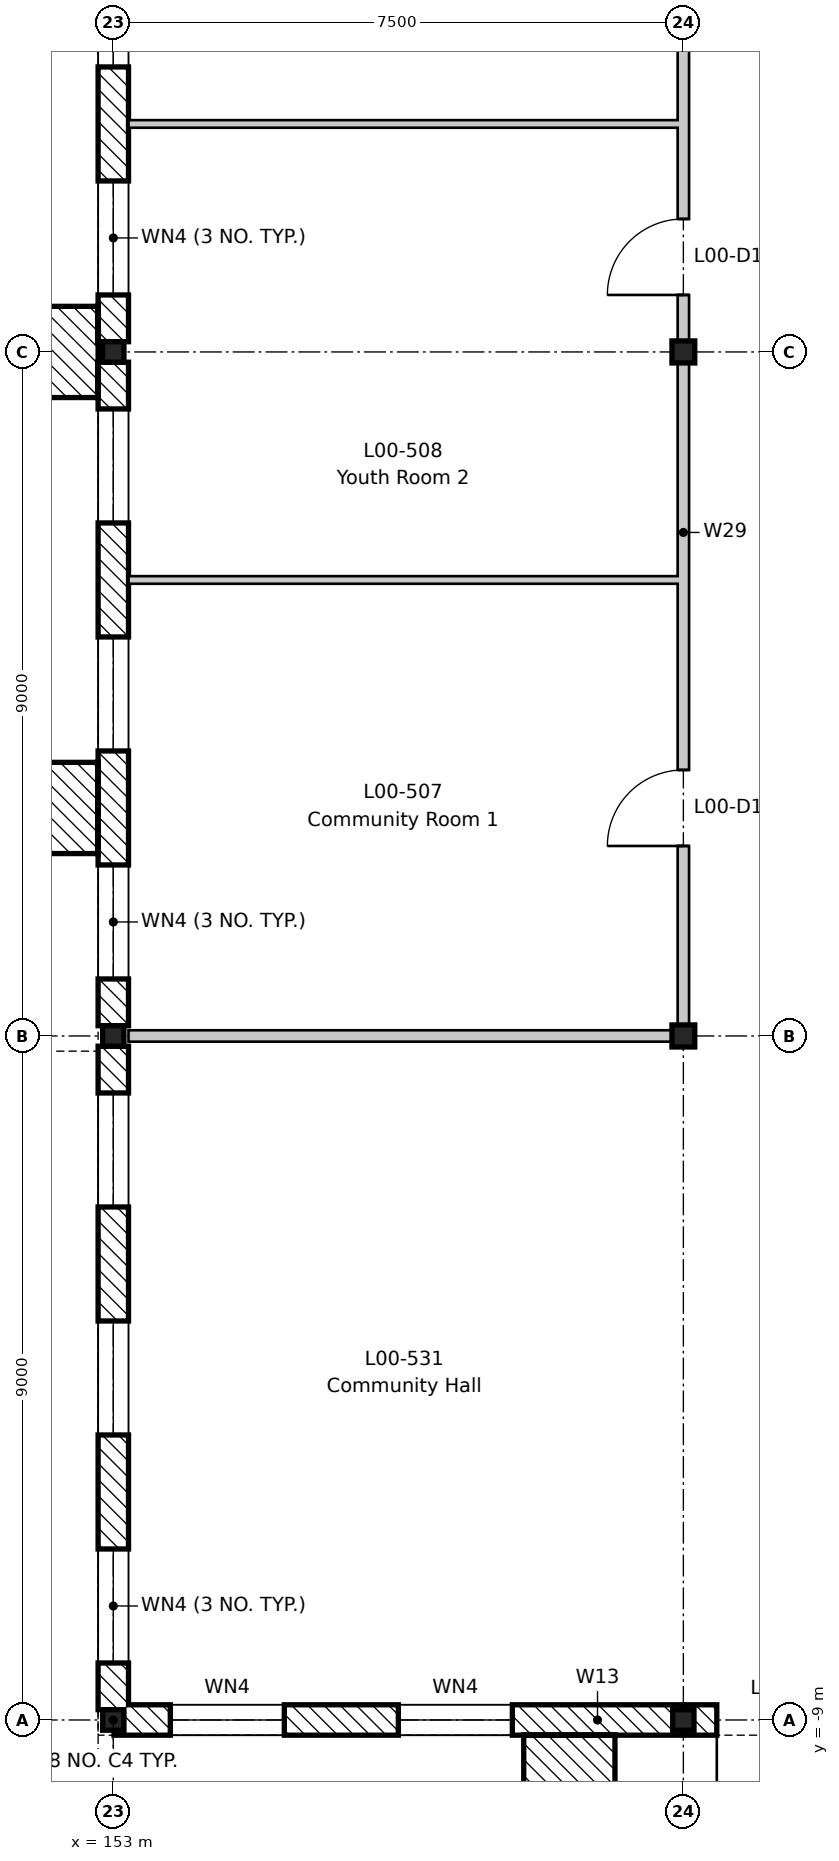
"""IFC4 building model, lengths in metres.
Left out: names, types, materials, properties, quantities, classifications, styles, units other than length and angle.
Written with IfcOpenShell. Run it as: python <this file> out.ifc"""

import sys

from ifc_helpers import new_model, si_unit, direction, frame, frame_2d, origin, origin_2d, place, context, subcontext, project, spatial, rectangle, i_section, extrude, element, fill, save


model = new_model("IFC4")
c1 = context("Model", 3, precision=1e-05, world=origin(), true_north=direction((0.0, 1.0)))
c2 = subcontext(c1, "Body", "Model", "MODEL_VIEW")
j1 = project(units=[si_unit("LENGTHUNIT", "METRE"), si_unit("PLANEANGLEUNIT", "RADIAN")], contexts=[c1])
p1 = place(None, origin())
s1 = spatial("IfcSite", under=j1, at=p1, CompositionType="ELEMENT")
p2 = place(p1, origin())
s2 = spatial("IfcBuilding", under=s1, at=p2, CompositionType="ELEMENT")
p3 = place(p2, origin())
s3 = spatial("IfcBuildingStorey", under=s2, at=p3, CompositionType="ELEMENT", Elevation=0.0)
for number, where, z_axis, x_axis in (
    (1, (153.0, -9.0, -0.6), (0.0, 0.0, 1.0), (1.0, 0.0, 0.0)),
    (2, (153.0, 0.0, -0.6), (0.0, 0.0, 1.0), (1.0, 0.0, 0.0)),
    (3, (153.0, 9.0, -0.6), (0.0, 0.0, 1.0), (1.0, 0.0, 0.0)),
    (4, (160.5, -9.0, -0.6), (0.0, 0.0, 1.0), (1.0, 0.0, 0.0)),
):
    element("IfcColumn", number, at=place(p3, frame(where, z_axis=z_axis, x_axis=x_axis)), inside=s3, PredefinedType="COLUMN", context=c2, shape_type="SweptSolid", body=[
        extrude(i_section(OverallWidth=0.28, OverallDepth=0.27, WebThickness=0.008, FlangeThickness=0.013, FilletRadius=0.024, at=origin_2d()), origin(), (0.0, 0.0, 1.0), 5.8),
    ])
for number, where, z_axis, x_axis in (
    (5, (160.5, 0.0, -0.6), (0.0, 0.0, 1.0), (1.0, 0.0, 0.0)),
    (6, (160.5, 9.0, -0.6), (0.0, 0.0, 1.0), (1.0, 0.0, 0.0)),
):
    element("IfcColumn", number, at=place(p3, frame(where, z_axis=z_axis, x_axis=x_axis)), inside=s3, PredefinedType="COLUMN", context=c2, shape_type="SweptSolid", body=[
        extrude(i_section(OverallWidth=0.3, OverallDepth=0.29, WebThickness=0.009, FlangeThickness=0.014, FilletRadius=0.027, at=origin_2d()), origin(), (0.0, 0.0, 1.0), 5.8),
    ])
p4 = place(p3, frame((153.0, -8.865, 0.0), z_axis=(0.0, 0.0, 1.0), x_axis=(0.0, 1.0, 0.0)))
e7 = element("IfcWall", 7, at=p4, inside=s3, PredefinedType="STANDARD", context=c2, shape_type="SweptSolid", body=[
    extrude(rectangle(XDim=8.73, YDim=0.4, at=frame_2d((4.365, 0.0))), origin(), (0.0, 0.0, 1.0), 4.8),
])
p5 = place(p4, frame((0.615, 0.0, 0.3)))
e8 = element("IfcOpeningElement", 8, at=p5, cuts=e7, PredefinedType="OPENING", context=c2, shape_type="SweptSolid", body=[
    extrude(rectangle(XDim=1.5, YDim=3.3, at=frame_2d((0.75, 1.65))), frame((0.0, 0.21, 0.0), z_axis=(0.0, -1.0, 0.0), x_axis=(1.0, 0.0, 0.0)), (0.0, 0.0, 1.0), 0.42),
])
p6 = place(p4, frame((3.615, 0.0, 0.3)))
e9 = element("IfcOpeningElement", 9, at=p6, cuts=e7, PredefinedType="OPENING", context=c2, shape_type="SweptSolid", body=[
    extrude(rectangle(XDim=1.5, YDim=3.3, at=frame_2d((0.75, 1.65))), frame((0.0, 0.21, 0.0), z_axis=(0.0, -1.0, 0.0), x_axis=(1.0, 0.0, 0.0)), (0.0, 0.0, 1.0), 0.42),
])
p7 = place(p4, frame((6.615, 0.0, 0.3)))
e10 = element("IfcOpeningElement", 10, at=p7, cuts=e7, PredefinedType="OPENING", context=c2, shape_type="SweptSolid", body=[
    extrude(rectangle(XDim=1.5, YDim=3.3, at=frame_2d((0.75, 1.65))), frame((0.0, 0.21, 0.0), z_axis=(0.0, -1.0, 0.0), x_axis=(1.0, 0.0, 0.0)), (0.0, 0.0, 1.0), 0.42),
])
p8 = place(p3, frame((153.0, 0.135, 0.0), z_axis=(0.0, 0.0, 1.0), x_axis=(0.0, 1.0, 0.0)))
e11 = element("IfcWall", 11, at=p8, inside=s3, PredefinedType="STANDARD", context=c2, shape_type="SweptSolid", body=[
    extrude(rectangle(XDim=8.73, YDim=0.4, at=frame_2d((4.365, 0.0))), origin(), (0.0, 0.0, 1.0), 4.8),
])
p9 = place(p8, frame((0.615, 0.0, 0.3)))
e12 = element("IfcOpeningElement", 12, at=p9, cuts=e11, PredefinedType="OPENING", context=c2, shape_type="SweptSolid", body=[
    extrude(rectangle(XDim=1.5, YDim=3.3, at=frame_2d((0.75, 1.65))), frame((0.0, 0.21, 0.0), z_axis=(0.0, -1.0, 0.0), x_axis=(1.0, 0.0, 0.0)), (0.0, 0.0, 1.0), 0.42),
])
p10 = place(p8, frame((3.615, 0.0, 0.3)))
e13 = element("IfcOpeningElement", 13, at=p10, cuts=e11, PredefinedType="OPENING", context=c2, shape_type="SweptSolid", body=[
    extrude(rectangle(XDim=1.5, YDim=3.3, at=frame_2d((0.75, 1.65))), frame((0.0, 0.21, 0.0), z_axis=(0.0, -1.0, 0.0), x_axis=(1.0, 0.0, 0.0)), (0.0, 0.0, 1.0), 0.42),
])
p11 = place(p8, frame((6.615, 0.0, 0.3)))
e14 = element("IfcOpeningElement", 14, at=p11, cuts=e11, PredefinedType="OPENING", context=c2, shape_type="SweptSolid", body=[
    extrude(rectangle(XDim=1.5, YDim=3.3, at=frame_2d((0.75, 1.65))), frame((0.0, 0.21, 0.0), z_axis=(0.0, -1.0, 0.0), x_axis=(1.0, 0.0, 0.0)), (0.0, 0.0, 1.0), 0.42),
])
p12 = place(p3, frame((153.0, 9.135, 0.0), z_axis=(0.0, 0.0, 1.0), x_axis=(0.0, 1.0, 0.0)))
e15 = element("IfcWall", 15, at=p12, inside=s3, PredefinedType="STANDARD", context=c2, shape_type="SweptSolid", body=[
    extrude(rectangle(XDim=8.73, YDim=0.4, at=frame_2d((4.365, 0.0))), origin(), (0.0, 0.0, 1.0), 4.8),
])
p13 = place(p12, frame((0.615, 0.0, 0.3)))
e16 = element("IfcOpeningElement", 16, at=p13, cuts=e15, PredefinedType="OPENING", context=c2, shape_type="SweptSolid", body=[
    extrude(rectangle(XDim=1.5, YDim=3.3, at=frame_2d((0.75, 1.65))), frame((0.0, 0.21, 0.0), z_axis=(0.0, -1.0, 0.0), x_axis=(1.0, 0.0, 0.0)), (0.0, 0.0, 1.0), 0.42),
])
p14 = place(p12, frame((3.615, 0.0, 0.3)))
e17 = element("IfcOpeningElement", 17, at=p14, cuts=e15, PredefinedType="OPENING", context=c2, shape_type="SweptSolid", body=[
    extrude(rectangle(XDim=1.5, YDim=3.3, at=frame_2d((0.75, 1.65))), frame((0.0, 0.21, 0.0), z_axis=(0.0, -1.0, 0.0), x_axis=(1.0, 0.0, 0.0)), (0.0, 0.0, 1.0), 0.42),
])
p15 = place(p12, frame((6.615, 0.0, 0.3)))
e18 = element("IfcOpeningElement", 18, at=p15, cuts=e15, PredefinedType="OPENING", context=c2, shape_type="SweptSolid", body=[
    extrude(rectangle(XDim=1.5, YDim=3.3, at=frame_2d((0.75, 1.65))), frame((0.0, 0.21, 0.0), z_axis=(0.0, -1.0, 0.0), x_axis=(1.0, 0.0, 0.0)), (0.0, 0.0, 1.0), 0.42),
])
p16 = place(p3, frame((160.491, -9.0, 0.0), z_axis=(0.0, 0.0, 1.0), x_axis=(-1.0, 0.0, 0.0)))
e19 = element("IfcWall", 19, at=p16, inside=s3, PredefinedType="STANDARD", context=c2, shape_type="SweptSolid", body=[
    extrude(rectangle(XDim=7.482, YDim=0.4, at=frame_2d((3.741, 0.0))), origin(), (0.0, 0.0, 1.0), 4.87),
])
p17 = place(p16, frame((5.241, 0.0, 0.3)))
e20 = element("IfcOpeningElement", 20, at=p17, cuts=e19, PredefinedType="OPENING", context=c2, shape_type="SweptSolid", body=[
    extrude(rectangle(XDim=1.5, YDim=3.3, at=frame_2d((0.75, 1.65))), frame((0.0, 0.21, 0.0), z_axis=(0.0, -1.0, 0.0), x_axis=(1.0, 0.0, 0.0)), (0.0, 0.0, 1.0), 0.42),
])
p18 = place(p16, frame((2.241, 0.0, 0.3)))
e21 = element("IfcOpeningElement", 21, at=p18, cuts=e19, PredefinedType="OPENING", context=c2, shape_type="SweptSolid", body=[
    extrude(rectangle(XDim=1.5, YDim=3.3, at=frame_2d((0.75, 1.65))), frame((0.0, 0.21, 0.0), z_axis=(0.0, -1.0, 0.0), x_axis=(1.0, 0.0, 0.0)), (0.0, 0.0, 1.0), 0.42),
])
p19 = place(p3, frame((163.491, -9.0, 0.0), z_axis=(0.0, 0.0, 1.0), x_axis=(-1.0, 0.0, 0.0)))
e22 = element("IfcWall", 22, at=p19, inside=s3, PredefinedType="STANDARD", context=c2, shape_type="SweptSolid", body=[
    extrude(rectangle(XDim=2.982, YDim=0.4, at=frame_2d((1.491, 0.0))), origin(), (0.0, 0.0, 1.0), 5.0),
])
p20 = place(p19, frame((0.431, 0.0, 0.0)))
e23 = element("IfcOpeningElement", 23, at=p20, cuts=e22, PredefinedType="OPENING", context=c2, shape_type="SweptSolid", body=[
    extrude(rectangle(XDim=2.12, YDim=2.4, at=frame_2d((1.06, 1.2))), frame((0.0, 0.21, 0.0), z_axis=(0.0, -1.0, 0.0), x_axis=(1.0, 0.0, 0.0)), (0.0, 0.0, 1.0), 0.42),
])
for number, where, z_axis, x_axis in (
    (24, (152.2, 2.4, 0.0), (0.0, 0.0, 1.0), (0.0, 1.0, 0.0)),
    (25, (152.2, 8.4, 0.0), (0.0, 0.0, 1.0), (0.0, 1.0, 0.0)),
    (26, (158.4, -9.8, 0.0), (0.0, 0.0, 1.0), (1.0, 0.0, 0.0)),
):
    element("IfcWall", number, at=place(p3, frame(where, z_axis=z_axis, x_axis=x_axis)), inside=s3, PredefinedType="STANDARD", context=c2, shape_type="SweptSolid", body=[
        extrude(rectangle(XDim=1.2, YDim=1.2, at=frame_2d((0.6, 0.0))), origin(), (0.0, 0.0, 1.0), 5.4),
    ])
p21 = place(p3, frame((153.2, 0.0, 0.0), z_axis=(0.0, 0.0, 1.0), x_axis=(1.0, 0.0, 0.0)))
e27 = element("IfcWall", 27, at=p21, inside=s3, PredefinedType="PARTITIONING", context=c2, shape_type="SweptSolid", body=[
    extrude(rectangle(XDim=7.225, YDim=0.15, at=frame_2d((3.613, 0.0))), origin(), (0.0, 0.0, 1.0), 4.85),
])
for number, where, z_axis, x_axis in (
    (28, (153.2, 6.0, 0.0), (0.0, 0.0, 1.0), (1.0, 0.0, 0.0)),
    (29, (153.2, 12.0, 0.0), (0.0, 0.0, 1.0), (1.0, 0.0, 0.0)),
):
    element("IfcWall", number, at=place(p3, frame(where, z_axis=z_axis, x_axis=x_axis)), inside=s3, PredefinedType="PARTITIONING", context=c2, shape_type="SweptSolid", body=[
        extrude(rectangle(XDim=7.225, YDim=0.1, at=frame_2d((3.613, 0.0))), origin(), (0.0, 0.0, 1.0), 5.2),
    ])
p22 = place(p3, frame((160.5, 0.0, 0.0), z_axis=(0.0, 0.0, 1.0), x_axis=(0.0, 1.0, 0.0)))
e30 = element("IfcWall", 30, at=p22, inside=s3, PredefinedType="PARTITIONING", context=c2, shape_type="SweptSolid", body=[
    extrude(rectangle(XDim=53.8, YDim=0.15, at=frame_2d((26.9, 0.0))), origin(), (0.0, 0.0, 1.0), 4.68),
])
p23 = place(p22, frame((2.5, 0.0, 0.0)))
e31 = element("IfcOpeningElement", 31, at=p23, cuts=e30, PredefinedType="OPENING", context=c2, shape_type="SweptSolid", body=[
    extrude(rectangle(XDim=1.0, YDim=2.1, at=frame_2d((0.5, 1.05))), frame((0.0, 0.085, 0.0), z_axis=(0.0, -1.0, 0.0), x_axis=(1.0, 0.0, 0.0)), (0.0, 0.0, 1.0), 0.17),
])
p24 = place(p22, frame((9.75, 0.0, 0.0)))
e32 = element("IfcOpeningElement", 32, at=p24, cuts=e30, PredefinedType="OPENING", context=c2, shape_type="SweptSolid", body=[
    extrude(rectangle(XDim=1.0, YDim=2.1, at=frame_2d((0.5, 1.05))), frame((0.0, 0.085, 0.0), z_axis=(0.0, -1.0, 0.0), x_axis=(1.0, 0.0, 0.0)), (0.0, 0.0, 1.0), 0.17),
])
p25 = place(p22, frame((14.5, 0.0, 0.0)))
e33 = element("IfcOpeningElement", 33, at=p25, cuts=e30, PredefinedType="OPENING", context=c2, shape_type="SweptSolid", body=[
    extrude(rectangle(XDim=1.0, YDim=2.1, at=frame_2d((0.5, 1.05))), frame((0.0, 0.085, 0.0), z_axis=(0.0, -1.0, 0.0), x_axis=(1.0, 0.0, 0.0)), (0.0, 0.0, 1.0), 0.17),
])
p26 = place(p22, frame((19.0, 0.0, 0.0)))
e34 = element("IfcOpeningElement", 34, at=p26, cuts=e30, PredefinedType="OPENING", context=c2, shape_type="SweptSolid", body=[
    extrude(rectangle(XDim=1.0, YDim=2.1, at=frame_2d((0.5, 1.05))), frame((0.0, 0.085, 0.0), z_axis=(0.0, -1.0, 0.0), x_axis=(1.0, 0.0, 0.0)), (0.0, 0.0, 1.0), 0.17),
])
p27 = place(p22, frame((24.8, 0.0, 0.0)))
e35 = element("IfcOpeningElement", 35, at=p27, cuts=e30, PredefinedType="OPENING", context=c2, shape_type="SweptSolid", body=[
    extrude(rectangle(XDim=1.4, YDim=2.1, at=frame_2d((0.7, 1.05))), frame((0.0, 0.085, 0.0), z_axis=(0.0, -1.0, 0.0), x_axis=(1.0, 0.0, 0.0)), (0.0, 0.0, 1.0), 0.17),
])
p28 = place(p22, frame((32.5, 0.0, 0.0)))
e36 = element("IfcOpeningElement", 36, at=p28, cuts=e30, PredefinedType="OPENING", context=c2, shape_type="SweptSolid", body=[
    extrude(rectangle(XDim=1.0, YDim=2.1, at=frame_2d((0.5, 1.05))), frame((0.0, 0.085, 0.0), z_axis=(0.0, -1.0, 0.0), x_axis=(1.0, 0.0, 0.0)), (0.0, 0.0, 1.0), 0.17),
])
p29 = place(p22, frame((37.0, 0.0, 0.0)))
e37 = element("IfcOpeningElement", 37, at=p29, cuts=e30, PredefinedType="OPENING", context=c2, shape_type="SweptSolid", body=[
    extrude(rectangle(XDim=1.0, YDim=2.1, at=frame_2d((0.5, 1.05))), frame((0.0, 0.085, 0.0), z_axis=(0.0, -1.0, 0.0), x_axis=(1.0, 0.0, 0.0)), (0.0, 0.0, 1.0), 0.17),
])
p30 = place(p22, frame((40.0, 0.0, 0.0)))
e38 = element("IfcOpeningElement", 38, at=p30, cuts=e30, PredefinedType="OPENING", context=c2, shape_type="SweptSolid", body=[
    extrude(rectangle(XDim=1.0, YDim=2.1, at=frame_2d((0.5, 1.05))), frame((0.0, 0.085, 0.0), z_axis=(0.0, -1.0, 0.0), x_axis=(1.0, 0.0, 0.0)), (0.0, 0.0, 1.0), 0.17),
])
p31 = place(p22, frame((45.75, 0.0, 0.0)))
e39 = element("IfcOpeningElement", 39, at=p31, cuts=e30, PredefinedType="OPENING", context=c2, shape_type="SweptSolid", body=[
    extrude(rectangle(XDim=1.0, YDim=2.1, at=frame_2d((0.5, 1.05))), frame((0.0, 0.085, 0.0), z_axis=(0.0, -1.0, 0.0), x_axis=(1.0, 0.0, 0.0)), (0.0, 0.0, 1.0), 0.17),
])
p32 = place(p22, frame((49.0, 0.0, 0.0)))
e40 = element("IfcOpeningElement", 40, at=p32, cuts=e30, PredefinedType="OPENING", context=c2, shape_type="SweptSolid", body=[
    extrude(rectangle(XDim=1.0, YDim=2.1, at=frame_2d((0.5, 1.05))), frame((0.0, 0.085, 0.0), z_axis=(0.0, -1.0, 0.0), x_axis=(1.0, 0.0, 0.0)), (0.0, 0.0, 1.0), 0.17),
])
p33 = place(p22, frame((52.0, 0.0, 0.0)))
e41 = element("IfcOpeningElement", 41, at=p33, cuts=e30, PredefinedType="OPENING", context=c2, shape_type="SweptSolid", body=[
    extrude(rectangle(XDim=1.0, YDim=2.1, at=frame_2d((0.5, 1.05))), frame((0.0, 0.085, 0.0), z_axis=(0.0, -1.0, 0.0), x_axis=(1.0, 0.0, 0.0)), (0.0, 0.0, 1.0), 0.17),
])
p34 = place(p5, origin())
e42 = element("IfcWindow", 42, at=p34, inside=s3, PartitioningType="SINGLE_PANEL", PredefinedType="WINDOW", context=c2, shape_type="SweptSolid", body=[
    extrude(rectangle(XDim=1.5, YDim=3.3, at=frame_2d((0.75, 1.65))), frame((0.0, -0.12, 0.0), z_axis=(0.0, -1.0, 0.0), x_axis=(1.0, 0.0, 0.0)), (0.0, 0.0, 1.0), 0.06),
])
fill(e8, e42)
p35 = place(p6, origin())
e43 = element("IfcWindow", 43, at=p35, inside=s3, PartitioningType="SINGLE_PANEL", PredefinedType="WINDOW", context=c2, shape_type="SweptSolid", body=[
    extrude(rectangle(XDim=1.5, YDim=3.3, at=frame_2d((0.75, 1.65))), frame((0.0, -0.12, 0.0), z_axis=(0.0, -1.0, 0.0), x_axis=(1.0, 0.0, 0.0)), (0.0, 0.0, 1.0), 0.06),
])
fill(e9, e43)
p36 = place(p7, origin())
e44 = element("IfcWindow", 44, at=p36, inside=s3, PartitioningType="SINGLE_PANEL", PredefinedType="WINDOW", context=c2, shape_type="SweptSolid", body=[
    extrude(rectangle(XDim=1.5, YDim=3.3, at=frame_2d((0.75, 1.65))), frame((0.0, -0.12, 0.0), z_axis=(0.0, -1.0, 0.0), x_axis=(1.0, 0.0, 0.0)), (0.0, 0.0, 1.0), 0.06),
])
fill(e10, e44)
p37 = place(p9, origin())
e45 = element("IfcWindow", 45, at=p37, inside=s3, PartitioningType="SINGLE_PANEL", PredefinedType="WINDOW", context=c2, shape_type="SweptSolid", body=[
    extrude(rectangle(XDim=1.5, YDim=3.3, at=frame_2d((0.75, 1.65))), frame((0.0, -0.12, 0.0), z_axis=(0.0, -1.0, 0.0), x_axis=(1.0, 0.0, 0.0)), (0.0, 0.0, 1.0), 0.06),
])
fill(e12, e45)
p38 = place(p10, origin())
e46 = element("IfcWindow", 46, at=p38, inside=s3, PartitioningType="SINGLE_PANEL", PredefinedType="WINDOW", context=c2, shape_type="SweptSolid", body=[
    extrude(rectangle(XDim=1.5, YDim=3.3, at=frame_2d((0.75, 1.65))), frame((0.0, -0.12, 0.0), z_axis=(0.0, -1.0, 0.0), x_axis=(1.0, 0.0, 0.0)), (0.0, 0.0, 1.0), 0.06),
])
fill(e13, e46)
p39 = place(p11, origin())
e47 = element("IfcWindow", 47, at=p39, inside=s3, PartitioningType="SINGLE_PANEL", PredefinedType="WINDOW", context=c2, shape_type="SweptSolid", body=[
    extrude(rectangle(XDim=1.5, YDim=3.3, at=frame_2d((0.75, 1.65))), frame((0.0, -0.12, 0.0), z_axis=(0.0, -1.0, 0.0), x_axis=(1.0, 0.0, 0.0)), (0.0, 0.0, 1.0), 0.06),
])
fill(e14, e47)
p40 = place(p13, origin())
e48 = element("IfcWindow", 48, at=p40, inside=s3, PartitioningType="SINGLE_PANEL", PredefinedType="WINDOW", context=c2, shape_type="SweptSolid", body=[
    extrude(rectangle(XDim=1.5, YDim=3.3, at=frame_2d((0.75, 1.65))), frame((0.0, -0.12, 0.0), z_axis=(0.0, -1.0, 0.0), x_axis=(1.0, 0.0, 0.0)), (0.0, 0.0, 1.0), 0.06),
])
fill(e16, e48)
p41 = place(p14, origin())
e49 = element("IfcWindow", 49, at=p41, inside=s3, PartitioningType="SINGLE_PANEL", PredefinedType="WINDOW", context=c2, shape_type="SweptSolid", body=[
    extrude(rectangle(XDim=1.5, YDim=3.3, at=frame_2d((0.75, 1.65))), frame((0.0, -0.12, 0.0), z_axis=(0.0, -1.0, 0.0), x_axis=(1.0, 0.0, 0.0)), (0.0, 0.0, 1.0), 0.06),
])
fill(e17, e49)
p42 = place(p17, origin())
e50 = element("IfcWindow", 50, at=p42, inside=s3, PartitioningType="SINGLE_PANEL", PredefinedType="WINDOW", context=c2, shape_type="SweptSolid", body=[
    extrude(rectangle(XDim=1.5, YDim=3.3, at=frame_2d((0.75, 1.65))), frame((0.0, -0.12, 0.0), z_axis=(0.0, -1.0, 0.0), x_axis=(1.0, 0.0, 0.0)), (0.0, 0.0, 1.0), 0.06),
])
fill(e20, e50)
p43 = place(p18, origin())
e51 = element("IfcWindow", 51, at=p43, inside=s3, PartitioningType="SINGLE_PANEL", PredefinedType="WINDOW", context=c2, shape_type="SweptSolid", body=[
    extrude(rectangle(XDim=1.5, YDim=3.3, at=frame_2d((0.75, 1.65))), frame((0.0, -0.12, 0.0), z_axis=(0.0, -1.0, 0.0), x_axis=(1.0, 0.0, 0.0)), (0.0, 0.0, 1.0), 0.06),
])
fill(e21, e51)
p44 = place(p20, origin())
e52 = element("IfcDoor", 52, at=p44, inside=s3, OperationType="DOUBLE_DOOR_SINGLE_SWING", PredefinedType="DOOR", context=c2, shape_type="SweptSolid", body=[
    extrude(rectangle(XDim=2.12, YDim=2.4, at=frame_2d((1.06, 1.2))), frame((0.0, 0.025, 0.0), z_axis=(0.0, -1.0, 0.0), x_axis=(1.0, 0.0, 0.0)), (0.0, 0.0, 1.0), 0.05),
])
fill(e23, e52)
p45 = place(p23, origin())
e53 = element("IfcDoor", 53, at=p45, inside=s3, OperationType="SINGLE_SWING_LEFT", PredefinedType="DOOR", context=c2, shape_type="SweptSolid", body=[
    extrude(rectangle(XDim=1.0, YDim=2.1, at=frame_2d((0.5, 1.05))), frame((0.0, 0.025, 0.0), z_axis=(0.0, -1.0, 0.0), x_axis=(1.0, 0.0, 0.0)), (0.0, 0.0, 1.0), 0.05),
])
fill(e31, e53)
p46 = place(p24, origin())
e54 = element("IfcDoor", 54, at=p46, inside=s3, OperationType="SINGLE_SWING_LEFT", PredefinedType="DOOR", context=c2, shape_type="SweptSolid", body=[
    extrude(rectangle(XDim=1.0, YDim=2.1, at=frame_2d((0.5, 1.05))), frame((0.0, 0.025, 0.0), z_axis=(0.0, -1.0, 0.0), x_axis=(1.0, 0.0, 0.0)), (0.0, 0.0, 1.0), 0.05),
])
fill(e32, e54)
save(model, sys.argv[1])
